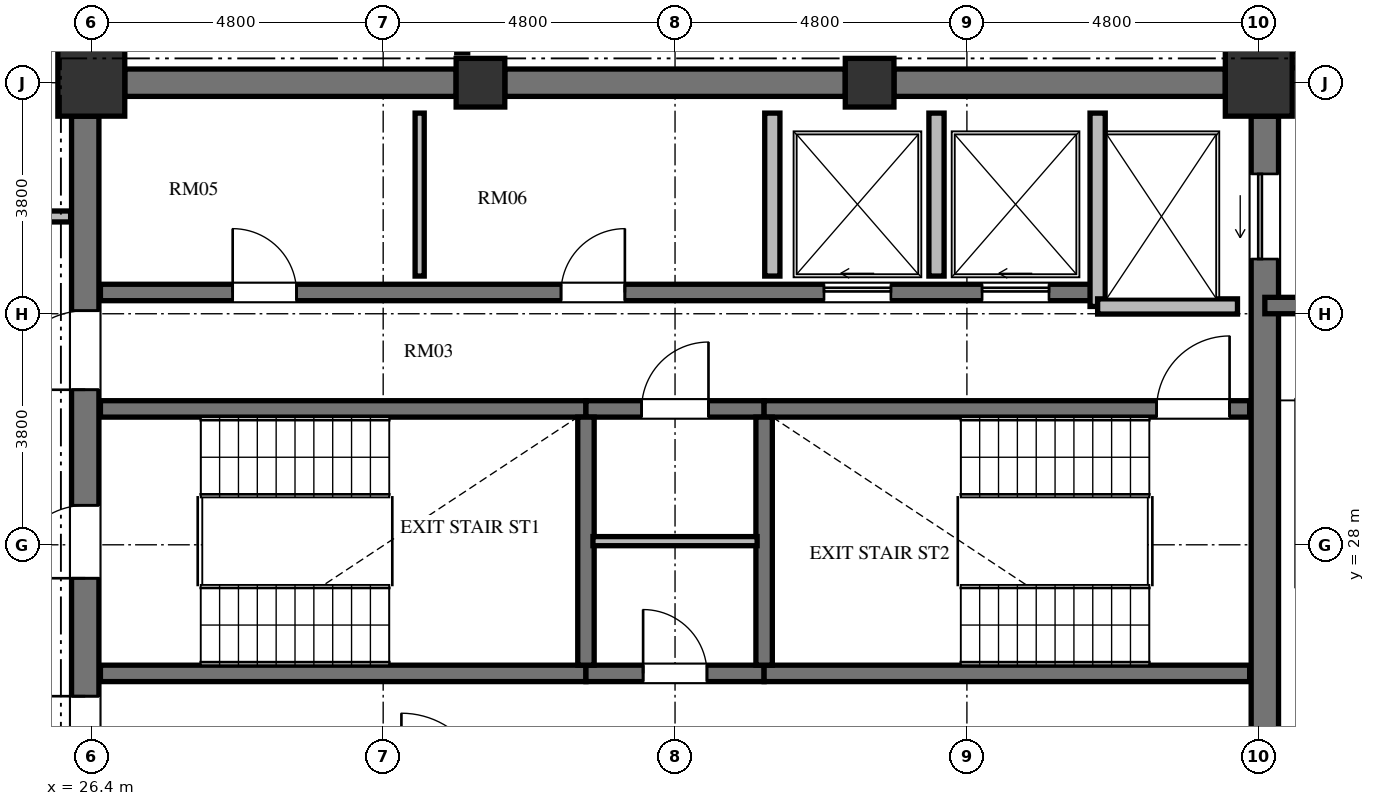
"""IFC4 building model, lengths in metres.
Left out: names, types, materials, properties, quantities, classifications, styles, units other than length and angle.
Written with IfcOpenShell. Run it as: python <this file> out.ifc"""

import sys

from ifc_helpers import new_model, si_unit, direction, frame, frame_2d, origin, origin_2d, place, context, subcontext, project, spatial, rectangle, extrude, element, fill, save


model = new_model("IFC4")
c1 = context("Model", 3, precision=1e-05, world=origin(), true_north=direction((0.0, 1.0)))
c2 = subcontext(c1, "Body", "Model", "MODEL_VIEW")
j1 = project(units=[si_unit("LENGTHUNIT", "METRE"), si_unit("PLANEANGLEUNIT", "RADIAN")], contexts=[c1])
p1 = place(None, origin())
s1 = spatial("IfcSite", under=j1, at=p1, CompositionType="ELEMENT")
p2 = place(p1, origin())
s2 = spatial("IfcBuilding", under=s1, at=p2, CompositionType="ELEMENT")
p3 = place(p2, frame((0.0, 0.0, 273.264)))
s3 = spatial("IfcBuildingStorey", under=s2, at=p3, CompositionType="ELEMENT", Elevation=273.264)
p4 = place(p3, frame((45.6, 35.6, 0.0), z_axis=(0.0, 0.0, 1.0), x_axis=(1.0, 0.0, 0.0)))
e1 = element("IfcColumn", 1, at=p4, inside=s3, PredefinedType="COLUMN", context=c2, shape_type="SweptSolid", body=[
    extrude(rectangle(XDim=1.1, YDim=1.1, at=origin_2d()), origin(), (0.0, 0.0, 1.0), 3.648),
])
for number, where, z_axis, x_axis in (
    (2, (39.2, 35.6, 0.0), (0.0, 0.0, 1.0), (1.0, 0.0, 0.0)),
    (3, (32.8, 35.6, 0.0), (0.0, 0.0, 1.0), (1.0, 0.0, 0.0)),
):
    element("IfcColumn", number, at=place(p3, frame(where, z_axis=z_axis, x_axis=x_axis)), inside=s3, PredefinedType="COLUMN", context=c2, shape_type="SweptSolid", body=[
        extrude(rectangle(XDim=0.8, YDim=0.8, at=origin_2d()), origin(), (0.0, 0.0, 1.0), 3.648),
    ])
p5 = place(p3, frame((26.4, 35.6, 0.0), z_axis=(0.0, 0.0, 1.0), x_axis=(1.0, 0.0, 0.0)))
e4 = element("IfcColumn", 4, at=p5, inside=s3, PredefinedType="COLUMN", context=c2, shape_type="SweptSolid", body=[
    extrude(rectangle(XDim=1.1, YDim=1.1, at=origin_2d()), origin(), (0.0, 0.0, 1.0), 3.648),
])
p6 = place(p3, frame((26.3, 20.95, 0.0), z_axis=(0.0, 0.0, 1.0), x_axis=(0.0, 1.0, 0.0)))
e5 = element("IfcWall", 5, at=p6, inside=s3, PredefinedType="SHEAR", context=c2, shape_type="SweptSolid", body=[
    extrude(rectangle(XDim=14.1, YDim=0.45, at=frame_2d((7.05, 0.0))), origin(), (0.0, 0.0, 1.0), 3.648),
])
p7 = place(p6, frame((6.5, 0.0, 0.0)))
e6 = element("IfcOpeningElement", 6, at=p7, cuts=e5, PredefinedType="OPENING", context=c2, shape_type="SweptSolid", body=[
    extrude(rectangle(XDim=1.2, YDim=2.15, at=frame_2d((0.6, 1.075))), frame((0.0, 0.235, 0.0), z_axis=(0.0, -1.0, 0.0), x_axis=(1.0, 0.0, 0.0)), (0.0, 0.0, 1.0), 0.47),
])
p8 = place(p6, frame((9.6, 0.0, 0.0)))
e7 = element("IfcOpeningElement", 7, at=p8, cuts=e5, PredefinedType="OPENING", context=c2, shape_type="SweptSolid", body=[
    extrude(rectangle(XDim=1.3, YDim=2.2, at=frame_2d((0.65, 1.1))), frame((0.0, 0.235, 0.0), z_axis=(0.0, -1.0, 0.0), x_axis=(1.0, 0.0, 0.0)), (0.0, 0.0, 1.0), 0.47),
])
p9 = place(p6, frame((3.26, 0.0, 0.0)))
e8 = element("IfcOpeningElement", 8, at=p9, cuts=e5, PredefinedType="OPENING", context=c2, shape_type="SweptSolid", body=[
    extrude(rectangle(XDim=1.3, YDim=2.2, at=frame_2d((0.65, 1.1))), frame((0.0, 0.235, 0.0), z_axis=(0.0, -1.0, 0.0), x_axis=(1.0, 0.0, 0.0)), (0.0, 0.0, 1.0), 0.47),
])
p10 = place(p3, frame((45.7, 20.95, 0.0), z_axis=(0.0, 0.0, 1.0), x_axis=(0.0, 1.0, 0.0)))
e9 = element("IfcWall", 9, at=p10, inside=s3, PredefinedType="SHEAR", context=c2, shape_type="SweptSolid", body=[
    extrude(rectangle(XDim=14.1, YDim=0.45, at=frame_2d((7.05, 0.0))), origin(), (0.0, 0.0, 1.0), 3.648),
])
p11 = place(p10, frame((11.75, 0.0, 0.0)))
e10 = element("IfcOpeningElement", 10, at=p11, cuts=e9, PredefinedType="OPENING", context=c2, shape_type="SweptSolid", body=[
    extrude(rectangle(XDim=1.4, YDim=2.3, at=frame_2d((0.7, 1.15))), frame((0.0, 0.235, 0.0), z_axis=(0.0, -1.0, 0.0), x_axis=(1.0, 0.0, 0.0)), (0.0, 0.0, 1.0), 0.47),
])
p12 = place(p10, frame((0.95, 0.0, 0.0)))
e11 = element("IfcOpeningElement", 11, at=p12, cuts=e9, PredefinedType="OPENING", context=c2, shape_type="SweptSolid", body=[
    extrude(rectangle(XDim=1.4, YDim=2.3, at=frame_2d((0.7, 1.15))), frame((0.0, 0.235, 0.0), z_axis=(0.0, -1.0, 0.0), x_axis=(1.0, 0.0, 0.0)), (0.0, 0.0, 1.0), 0.47),
])
p13 = place(p3, frame((26.95, 35.6, 0.0), z_axis=(0.0, 0.0, 1.0), x_axis=(1.0, 0.0, 0.0)))
e12 = element("IfcWall", 12, at=p13, inside=s3, PredefinedType="SHEAR", context=c2, shape_type="SweptSolid", body=[
    extrude(rectangle(XDim=5.45, YDim=0.45, at=frame_2d((2.725, 0.0))), origin(), (0.0, 0.0, 1.0), 3.648),
])
p14 = place(p3, frame((33.2, 35.6, 0.0), z_axis=(0.0, 0.0, 1.0), x_axis=(1.0, 0.0, 0.0)))
e13 = element("IfcWall", 13, at=p14, inside=s3, PredefinedType="SHEAR", context=c2, shape_type="SweptSolid", body=[
    extrude(rectangle(XDim=5.6, YDim=0.45, at=frame_2d((2.8, 0.0))), origin(), (0.0, 0.0, 1.0), 3.648),
])
p15 = place(p3, frame((39.6, 35.6, 0.0), z_axis=(0.0, 0.0, 1.0), x_axis=(1.0, 0.0, 0.0)))
e14 = element("IfcWall", 14, at=p15, inside=s3, PredefinedType="SHEAR", context=c2, shape_type="SweptSolid", body=[
    extrude(rectangle(XDim=5.45, YDim=0.45, at=frame_2d((2.725, 0.0))), origin(), (0.0, 0.0, 1.0), 3.648),
])
p16 = place(p3, frame((27.595, 38.808, 0.0), z_axis=(0.0, 0.0, 1.0), x_axis=(-0.728251519923, -0.685309947199, 0.0)))
e15 = element("IfcWall", 15, at=p16, inside=s3, PredefinedType="SOLIDWALL", context=c2, shape_type="SweptSolid", body=[
    extrude(rectangle(XDim=5.981, YDim=0.28, at=frame_2d((2.99, 0.0))), origin(), (0.0, 0.0, 1.0), 3.448),
])
p17 = place(p16, frame((2.391, 0.0, 0.85)))
e16 = element("IfcOpeningElement", 16, at=p17, cuts=e15, PredefinedType="OPENING", context=c2, shape_type="SweptSolid", body=[
    extrude(rectangle(XDim=1.2, YDim=1.8, at=frame_2d((0.6, 0.9))), frame((0.0, 0.15, 0.0), z_axis=(0.0, -1.0, 0.0), x_axis=(1.0, 0.0, 0.0)), (0.0, 0.0, 1.0), 0.3),
])
p18 = place(p3, frame((26.55, 30.235, 0.0), z_axis=(0.0, 0.0, 1.0), x_axis=(1.0, 0.0, 0.0)))
e17 = element("IfcWall", 17, at=p18, inside=s3, PredefinedType="SHEAR", context=c2, shape_type="SweptSolid", body=[
    extrude(rectangle(XDim=7.985, YDim=0.27, at=frame_2d((3.992, 0.0))), origin(), (0.0, 0.0, 1.0), 3.648),
])
p19 = place(p3, frame((34.535, 30.235, 0.0), z_axis=(0.0, 0.0, 1.0), x_axis=(1.0, 0.0, 0.0)))
e18 = element("IfcWall", 18, at=p19, inside=s3, PredefinedType="SHEAR", context=c2, shape_type="SweptSolid", body=[
    extrude(rectangle(XDim=2.93, YDim=0.27, at=frame_2d((1.465, 0.0))), origin(), (0.0, 0.0, 1.0), 3.648),
])
p20 = place(p19, frame((0.915, 0.0, 0.0)))
e19 = element("IfcOpeningElement", 19, at=p20, cuts=e18, PredefinedType="OPENING", context=c2, shape_type="SweptSolid", body=[
    extrude(rectangle(XDim=1.1, YDim=2.15, at=frame_2d((0.55, 1.075))), frame((0.0, 0.145, 0.0), z_axis=(0.0, -1.0, 0.0), x_axis=(1.0, 0.0, 0.0)), (0.0, 0.0, 1.0), 0.29),
])
p21 = place(p3, frame((37.465, 30.235, 0.0), z_axis=(0.0, 0.0, 1.0), x_axis=(1.0, 0.0, 0.0)))
e20 = element("IfcWall", 20, at=p21, inside=s3, PredefinedType="SHEAR", context=c2, shape_type="SweptSolid", body=[
    extrude(rectangle(XDim=7.985, YDim=0.27, at=frame_2d((3.992, 0.0))), origin(), (0.0, 0.0, 1.0), 3.648),
])
p22 = place(p21, frame((6.455, 0.0, 0.0)))
e21 = element("IfcOpeningElement", 21, at=p22, cuts=e20, PredefinedType="OPENING", context=c2, shape_type="SweptSolid", body=[
    extrude(rectangle(XDim=1.2, YDim=2.15, at=frame_2d((0.6, 1.075))), frame((0.0, 0.145, 0.0), z_axis=(0.0, -1.0, 0.0), x_axis=(1.0, 0.0, 0.0)), (0.0, 0.0, 1.0), 0.29),
])
p23 = place(p3, frame((26.55, 25.885, 0.0), z_axis=(0.0, 0.0, 1.0), x_axis=(1.0, 0.0, 0.0)))
e22 = element("IfcWall", 22, at=p23, inside=s3, PredefinedType="SHEAR", context=c2, shape_type="SweptSolid", body=[
    extrude(rectangle(XDim=7.985, YDim=0.27, at=frame_2d((3.992, 0.0))), origin(), (0.0, 0.0, 1.0), 3.648),
])
p24 = place(p3, frame((34.535, 25.885, 0.0), z_axis=(0.0, 0.0, 1.0), x_axis=(1.0, 0.0, 0.0)))
e23 = element("IfcWall", 23, at=p24, inside=s3, PredefinedType="SHEAR", context=c2, shape_type="SweptSolid", body=[
    extrude(rectangle(XDim=2.93, YDim=0.27, at=frame_2d((1.465, 0.0))), origin(), (0.0, 0.0, 1.0), 3.648),
])
p25 = place(p24, frame((0.94, 0.0, 0.0)))
e24 = element("IfcOpeningElement", 24, at=p25, cuts=e23, PredefinedType="OPENING", context=c2, shape_type="SweptSolid", body=[
    extrude(rectangle(XDim=1.05, YDim=2.15, at=frame_2d((0.525, 1.075))), frame((0.0, 0.145, 0.0), z_axis=(0.0, -1.0, 0.0), x_axis=(1.0, 0.0, 0.0)), (0.0, 0.0, 1.0), 0.29),
])
p26 = place(p3, frame((37.465, 25.885, 0.0), z_axis=(0.0, 0.0, 1.0), x_axis=(1.0, 0.0, 0.0)))
e25 = element("IfcWall", 25, at=p26, inside=s3, PredefinedType="SHEAR", context=c2, shape_type="SweptSolid", body=[
    extrude(rectangle(XDim=7.985, YDim=0.27, at=frame_2d((3.992, 0.0))), origin(), (0.0, 0.0, 1.0), 3.648),
])
for number, where, z_axis, x_axis in (
    (26, (34.535, 26.02, 0.0), (0.0, 0.0, 1.0), (0.0, 1.0, 0.0)),
    (27, (37.465, 26.02, 0.0), (0.0, 0.0, 1.0), (0.0, 1.0, 0.0)),
):
    element("IfcWall", number, at=place(p3, frame(where, z_axis=z_axis, x_axis=x_axis)), inside=s3, PredefinedType="SHEAR", context=c2, shape_type="SweptSolid", body=[
        extrude(rectangle(XDim=4.08, YDim=0.27, at=frame_2d((2.04, 0.0))), origin(), (0.0, 0.0, 1.0), 3.648),
    ])
p27 = place(p3, frame((34.65, 28.06, 0.0), z_axis=(0.0, 0.0, 1.0), x_axis=(1.0, 0.0, 0.0)))
e28 = element("IfcWall", 28, at=p27, inside=s3, PredefinedType="PARTITIONING", context=c2, shape_type="SweptSolid", body=[
    extrude(rectangle(XDim=2.7, YDim=0.15, at=frame_2d((1.35, 0.0))), origin(), (0.0, 0.0, 1.0), 3.448),
])
p28 = place(p3, frame((26.55, 32.15, 0.0), z_axis=(0.0, 0.0, 1.0), x_axis=(1.0, 0.0, 0.0)))
e29 = element("IfcWall", 29, at=p28, inside=s3, PredefinedType="SHEAR", context=c2, shape_type="SweptSolid", body=[
    extrude(rectangle(XDim=16.4, YDim=0.27, at=frame_2d((8.2, 0.0))), origin(), (0.0, 0.0, 1.0), 3.648),
])
p29 = place(p28, frame((2.175, 0.0, 0.0)))
e30 = element("IfcOpeningElement", 30, at=p29, cuts=e29, PredefinedType="OPENING", context=c2, shape_type="SweptSolid", body=[
    extrude(rectangle(XDim=1.05, YDim=2.15, at=frame_2d((0.525, 1.075))), frame((0.0, 0.145, 0.0), z_axis=(0.0, -1.0, 0.0), x_axis=(1.0, 0.0, 0.0)), (0.0, 0.0, 1.0), 0.29),
])
p30 = place(p28, frame((7.575, 0.0, 0.0)))
e31 = element("IfcOpeningElement", 31, at=p30, cuts=e29, PredefinedType="OPENING", context=c2, shape_type="SweptSolid", body=[
    extrude(rectangle(XDim=1.05, YDim=2.15, at=frame_2d((0.525, 1.075))), frame((0.0, 0.145, 0.0), z_axis=(0.0, -1.0, 0.0), x_axis=(1.0, 0.0, 0.0)), (0.0, 0.0, 1.0), 0.29),
])
p31 = place(p28, frame((11.9, 0.0, 0.0)))
e32 = element("IfcOpeningElement", 32, at=p31, cuts=e29, PredefinedType="OPENING", context=c2, shape_type="SweptSolid", body=[
    extrude(rectangle(XDim=1.1, YDim=2.2, at=frame_2d((0.55, 1.1))), frame((0.0, 0.145, 0.0), z_axis=(0.0, -1.0, 0.0), x_axis=(1.0, 0.0, 0.0)), (0.0, 0.0, 1.0), 0.29),
])
p32 = place(p28, frame((14.5, 0.0, 0.0)))
e33 = element("IfcOpeningElement", 33, at=p32, cuts=e29, PredefinedType="OPENING", context=c2, shape_type="SweptSolid", body=[
    extrude(rectangle(XDim=1.1, YDim=2.2, at=frame_2d((0.55, 1.1))), frame((0.0, 0.145, 0.0), z_axis=(0.0, -1.0, 0.0), x_axis=(1.0, 0.0, 0.0)), (0.0, 0.0, 1.0), 0.29),
])
p33 = place(p3, frame((42.95, 31.92, 0.0), z_axis=(0.0, 0.0, 1.0), x_axis=(0.0, 1.0, 0.0)))
e34 = element("IfcWall", 34, at=p33, inside=s3, PredefinedType="SOLIDWALL", context=c2, shape_type="SweptSolid", body=[
    extrude(rectangle(XDim=3.18, YDim=0.25, at=frame_2d((1.59, 0.0))), origin(), (0.0, 0.0, 1.0), 3.448),
])
p34 = place(p3, frame((42.95, 31.92, 0.0), z_axis=(0.0, 0.0, 1.0), x_axis=(1.0, 0.0, 0.0)))
e35 = element("IfcWall", 35, at=p34, inside=s3, PredefinedType="SOLIDWALL", context=c2, shape_type="SweptSolid", body=[
    extrude(rectangle(XDim=2.3, YDim=0.25, at=frame_2d((1.15, 0.0))), origin(), (0.0, 0.0, 1.0), 3.448),
])
for number, where, z_axis, x_axis in (
    (36, (37.6, 32.42, 0.0), (0.0, 0.0, 1.0), (0.0, 1.0, 0.0)),
    (37, (40.3, 32.42, 0.0), (0.0, 0.0, 1.0), (0.0, 1.0, 0.0)),
):
    element("IfcWall", number, at=place(p3, frame(where, z_axis=z_axis, x_axis=x_axis)), inside=s3, PredefinedType="SOLIDWALL", context=c2, shape_type="SweptSolid", body=[
        extrude(rectangle(XDim=2.68, YDim=0.25, at=frame_2d((1.34, 0.0))), origin(), (0.0, 0.0, 1.0), 3.448),
    ])
p35 = place(p3, frame((31.8, 32.42, 0.0), z_axis=(0.0, 0.0, 1.0), x_axis=(0.0, 1.0, 0.0)))
e38 = element("IfcWall", 38, at=p35, inside=s3, PredefinedType="PARTITIONING", context=c2, shape_type="SweptSolid", body=[
    extrude(rectangle(XDim=2.68, YDim=0.15, at=frame_2d((1.34, 0.0))), origin(), (0.0, 0.0, 1.0), 3.448),
])
p36 = place(p3, frame((45.925, 35.98, 0.0), z_axis=(0.0, 0.0, 1.0), x_axis=(1.0, 0.0, 0.0)))
e39 = element("IfcWall", 39, at=p36, inside=s3, PredefinedType="SHEAR", context=c2, shape_type="SweptSolid", body=[
    extrude(rectangle(XDim=4.625, YDim=0.27, at=frame_2d((2.312, 0.0))), origin(), (0.0, 0.0, 1.0), 3.648),
])
p37 = place(p3, frame((45.7, 31.935, 0.0), z_axis=(0.0, 0.0, 1.0), x_axis=(1.0, 0.0, 0.0)))
e40 = element("IfcWall", 40, at=p37, inside=s3, PredefinedType="SHEAR", context=c2, shape_type="SweptSolid", body=[
    extrude(rectangle(XDim=4.715, YDim=0.27, at=frame_2d((2.357, 0.0))), origin(), (0.0, 0.0, 1.0), 3.648),
])
p38 = place(p3, frame((32.5, 36.09, 0.0), z_axis=(0.0, 0.0, 1.0), x_axis=(0.0, 1.0, 0.0)))
e41 = element("IfcWall", 41, at=p38, inside=s3, PredefinedType="PARTITIONING", context=c2, shape_type="SweptSolid", body=[
    extrude(rectangle(XDim=2.35, YDim=0.18, at=frame_2d((1.175, 0.0))), origin(), (0.0, 0.0, 1.0), 3.448),
])
p39 = place(p3, frame((23.71, 33.4, 0.0), z_axis=(0.0, 0.0, 1.0), x_axis=(1.0, 0.0, 0.0)))
e42 = element("IfcWall", 42, at=p39, inside=s3, PredefinedType="PARTITIONING", context=c2, shape_type="SweptSolid", body=[
    extrude(rectangle(XDim=2.35, YDim=0.18, at=frame_2d((1.175, 0.0))), origin(), (0.0, 0.0, 1.0), 3.448),
])
p40 = place(p7, origin())
e43 = element("IfcDoor", 43, at=p40, inside=s3, OperationType="SINGLE_SWING_LEFT", PredefinedType="DOOR", context=c2, shape_type="SweptSolid", body=[
    extrude(rectangle(XDim=1.2, YDim=2.15, at=frame_2d((0.6, 1.075))), frame((0.0, 0.025, 0.0), z_axis=(0.0, -1.0, 0.0), x_axis=(1.0, 0.0, 0.0)), (0.0, 0.0, 1.0), 0.05),
])
fill(e6, e43)
p41 = place(p22, origin())
e44 = element("IfcDoor", 44, at=p41, inside=s3, OperationType="SINGLE_SWING_RIGHT", PredefinedType="DOOR", context=c2, shape_type="SweptSolid", body=[
    extrude(rectangle(XDim=1.2, YDim=2.15, at=frame_2d((0.6, 1.075))), frame((0.0, 0.025, 0.0), z_axis=(0.0, -1.0, 0.0), x_axis=(1.0, 0.0, 0.0)), (0.0, 0.0, 1.0), 0.05),
])
fill(e21, e44)
p42 = place(p25, origin())
e45 = element("IfcDoor", 45, at=p42, inside=s3, OperationType="SINGLE_SWING_LEFT", PredefinedType="DOOR", context=c2, shape_type="SweptSolid", body=[
    extrude(rectangle(XDim=1.05, YDim=2.15, at=frame_2d((0.525, 1.075))), frame((0.0, 0.025, 0.0), z_axis=(0.0, -1.0, 0.0), x_axis=(1.0, 0.0, 0.0)), (0.0, 0.0, 1.0), 0.05),
])
fill(e24, e45)
p43 = place(p20, origin())
e46 = element("IfcDoor", 46, at=p43, inside=s3, OperationType="SINGLE_SWING_RIGHT", PredefinedType="DOOR", context=c2, shape_type="SweptSolid", body=[
    extrude(rectangle(XDim=1.1, YDim=2.15, at=frame_2d((0.55, 1.075))), frame((0.0, 0.025, 0.0), z_axis=(0.0, -1.0, 0.0), x_axis=(1.0, 0.0, 0.0)), (0.0, 0.0, 1.0), 0.05),
])
fill(e19, e46)
p44 = place(p8, origin())
e47 = element("IfcDoor", 47, at=p44, inside=s3, OperationType="SINGLE_SWING_LEFT", PredefinedType="DOOR", context=c2, shape_type="SweptSolid", body=[
    extrude(rectangle(XDim=1.3, YDim=2.2, at=frame_2d((0.65, 1.1))), frame((0.0, 0.025, 0.0), z_axis=(0.0, -1.0, 0.0), x_axis=(1.0, 0.0, 0.0)), (0.0, 0.0, 1.0), 0.05),
])
fill(e7, e47)
p45 = place(p9, origin())
e48 = element("IfcDoor", 48, at=p45, inside=s3, OperationType="SINGLE_SWING_RIGHT", PredefinedType="DOOR", context=c2, shape_type="SweptSolid", body=[
    extrude(rectangle(XDim=1.3, YDim=2.2, at=frame_2d((0.65, 1.1))), frame((0.0, 0.025, 0.0), z_axis=(0.0, -1.0, 0.0), x_axis=(1.0, 0.0, 0.0)), (0.0, 0.0, 1.0), 0.05),
])
fill(e8, e48)
p46 = place(p29, origin())
e49 = element("IfcDoor", 49, at=p46, inside=s3, OperationType="SINGLE_SWING_LEFT", PredefinedType="DOOR", context=c2, shape_type="SweptSolid", body=[
    extrude(rectangle(XDim=1.05, YDim=2.15, at=frame_2d((0.525, 1.075))), frame((0.0, 0.025, 0.0), z_axis=(0.0, -1.0, 0.0), x_axis=(1.0, 0.0, 0.0)), (0.0, 0.0, 1.0), 0.05),
])
fill(e30, e49)
p47 = place(p30, origin())
e50 = element("IfcDoor", 50, at=p47, inside=s3, OperationType="SINGLE_SWING_RIGHT", PredefinedType="DOOR", context=c2, shape_type="SweptSolid", body=[
    extrude(rectangle(XDim=1.05, YDim=2.15, at=frame_2d((0.525, 1.075))), frame((0.0, 0.025, 0.0), z_axis=(0.0, -1.0, 0.0), x_axis=(1.0, 0.0, 0.0)), (0.0, 0.0, 1.0), 0.05),
])
fill(e31, e50)
p48 = place(p31, origin())
e51 = element("IfcDoor", 51, at=p48, inside=s3, OperationType="SLIDING_TO_LEFT", PredefinedType="DOOR", context=c2, shape_type="SweptSolid", body=[
    extrude(rectangle(XDim=1.1, YDim=2.2, at=frame_2d((0.55, 1.1))), frame((0.0, 0.025, 0.0), z_axis=(0.0, -1.0, 0.0), x_axis=(1.0, 0.0, 0.0)), (0.0, 0.0, 1.0), 0.05),
])
fill(e32, e51)
p49 = place(p32, origin())
e52 = element("IfcDoor", 52, at=p49, inside=s3, OperationType="SLIDING_TO_LEFT", PredefinedType="DOOR", context=c2, shape_type="SweptSolid", body=[
    extrude(rectangle(XDim=1.1, YDim=2.2, at=frame_2d((0.55, 1.1))), frame((0.0, 0.025, 0.0), z_axis=(0.0, -1.0, 0.0), x_axis=(1.0, 0.0, 0.0)), (0.0, 0.0, 1.0), 0.05),
])
fill(e33, e52)
p50 = place(p11, origin())
e53 = element("IfcDoor", 53, at=p50, inside=s3, OperationType="SLIDING_TO_LEFT", PredefinedType="DOOR", context=c2, shape_type="SweptSolid", body=[
    extrude(rectangle(XDim=1.4, YDim=2.3, at=frame_2d((0.7, 1.15))), frame((0.0, 0.025, 0.0), z_axis=(0.0, -1.0, 0.0), x_axis=(1.0, 0.0, 0.0)), (0.0, 0.0, 1.0), 0.05),
])
fill(e10, e53)
save(model, sys.argv[1])
